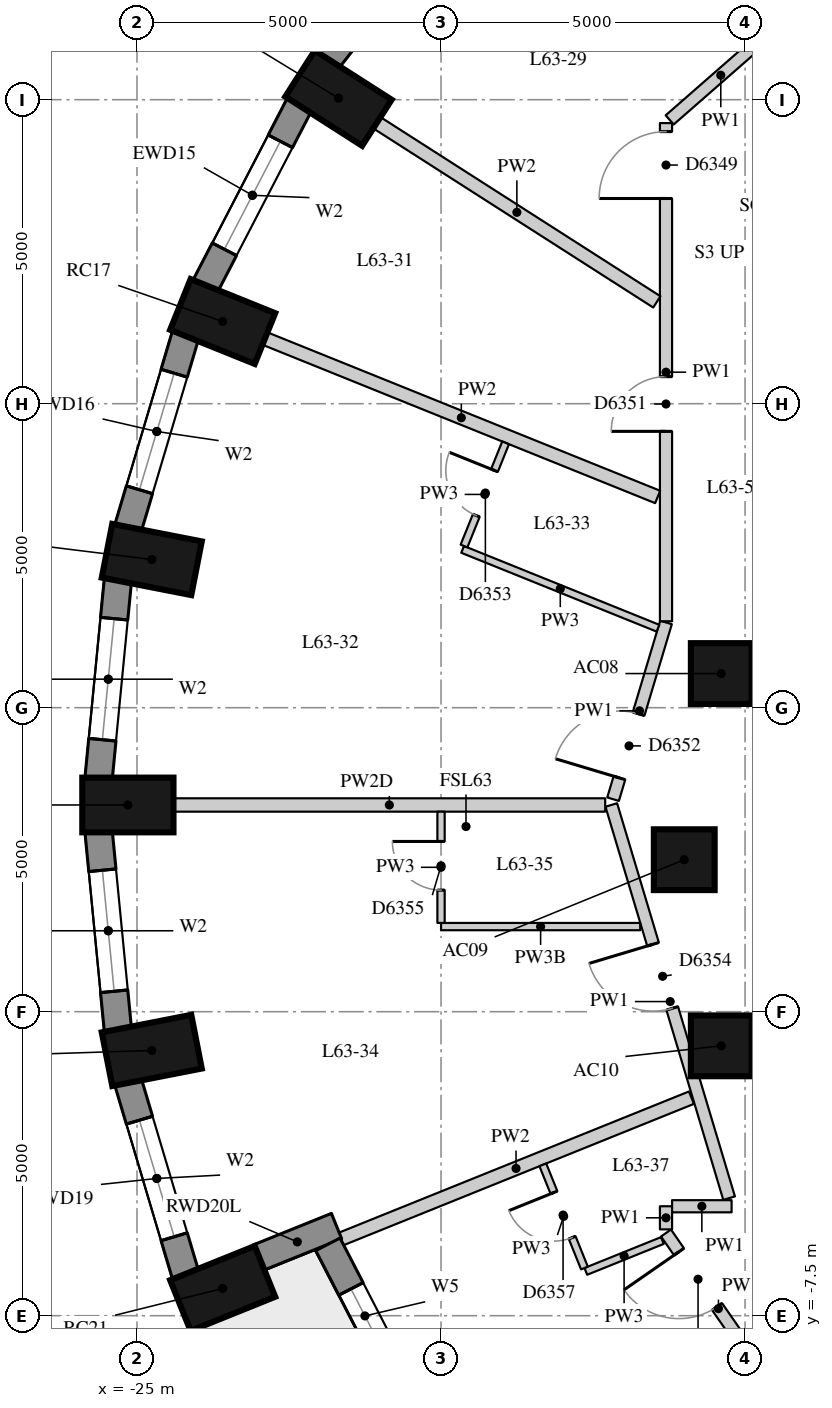
"""IFC4 building model, lengths in metres.
Left out: names, types, materials, properties, quantities, classifications, styles, units other than length and angle.
Written with IfcOpenShell. Run it as: python <this file> out.ifc"""

import sys

from ifc_helpers import new_model, si_unit, direction, frame, frame_2d, origin, origin_2d, place, context, subcontext, project, spatial, rectangle, extrude, element, fill, save


model = new_model("IFC4")
c1 = context("Model", 3, precision=1e-05, world=origin(), true_north=direction((0.0, 1.0)))
c2 = subcontext(c1, "Body", "Model", "MODEL_VIEW")
j1 = project(units=[si_unit("LENGTHUNIT", "METRE"), si_unit("PLANEANGLEUNIT", "RADIAN")], contexts=[c1])
p1 = place(None, origin())
s1 = spatial("IfcSite", under=j1, at=p1, CompositionType="ELEMENT")
p2 = place(p1, origin())
s2 = spatial("IfcBuilding", under=s1, at=p2, CompositionType="ELEMENT")
p3 = place(p2, frame((0.0, 0.0, 222.2)))
s3 = spatial("IfcBuildingStorey", under=s2, at=p3, CompositionType="ELEMENT", Elevation=222.2)
for number, where, z_axis, x_axis in (
    (1, (-21.687, 12.525, 0.0), (0.0, 0.0, 1.0), (-0.842, 0.539, 0.0)),
    (2, (-23.591, 8.852, 0.0), (0.0, 0.0, 1.0), (-0.927, 0.374, 0.0)),
    (3, (-24.757, 4.937, 0.0), (0.0, 0.0, 1.0), (-0.981, 0.192, 0.0)),
    (4, (-25.15, 0.9, 0.0), (0.0, 0.0, 1.0), (-1.0, 0.0, 0.0)),
    (5, (-24.757, -3.137, 0.0), (0.0, 0.0, 1.0), (-0.981, -0.192, 0.0)),
    (6, (-23.591, -7.052, 0.0), (0.0, 0.0, 1.0), (-0.927, -0.374, 0.0)),
):
    element("IfcColumn", number, at=place(p3, frame(where, z_axis=z_axis, x_axis=x_axis)), inside=s3, PredefinedType="COLUMN", context=c2, shape_type="SweptSolid", body=[
        extrude(rectangle(XDim=1.5, YDim=0.9, at=origin_2d()), origin(), (0.0, 0.0, 1.0), 3.3),
    ])
for number, where, z_axis, x_axis in (
    (7, (-15.391, 3.062, 0.0), (0.0, 0.0, 1.0), (1.0, 0.0, 0.0)),
    (8, (-16.0, 0.0, 0.0), (0.0, 0.0, 1.0), (1.0, 0.0, 0.0)),
    (9, (-15.391, -3.062, 0.0), (0.0, 0.0, 1.0), (1.0, 0.0, 0.0)),
):
    element("IfcColumn", number, at=place(p3, frame(where, z_axis=z_axis, x_axis=x_axis)), inside=s3, PredefinedType="COLUMN", context=c2, shape_type="SweptSolid", body=[
        extrude(rectangle(XDim=1.0, YDim=1.0, at=origin_2d()), origin(), (0.0, 0.0, 1.0), 3.3),
    ])
p4 = place(p3, frame((-19.751, 15.861, 0.0), z_axis=(0.0, 0.0, 1.0), x_axis=(-0.614220816451, -0.789134201919, 0.0)))
e10 = element("IfcWall", 10, at=p4, inside=s3, PredefinedType="SOLIDWALL", context=c2, shape_type="SweptSolid", body=[
    extrude(rectangle(XDim=3.438, YDim=0.45, at=frame_2d((1.719, 0.0))), origin(), (0.0, 0.0, 1.0), 3.02),
])
p5 = place(p4, frame((0.719, 0.0, 0.4)))
e11 = element("IfcOpeningElement", 11, at=p5, cuts=e10, PredefinedType="OPENING", context=c2, shape_type="SweptSolid", body=[
    extrude(rectangle(XDim=2.0, YDim=1.75, at=frame_2d((1.0, 0.875))), frame((0.0, 0.235, 0.0), z_axis=(0.0, -1.0, 0.0), x_axis=(1.0, 0.0, 0.0)), (0.0, 0.0, 1.0), 0.47),
])
p6 = place(p3, frame((-22.327, 12.424, 0.0), z_axis=(0.0, 0.0, 1.0), x_axis=(-0.460232593174, -0.887798378113, 0.0)))
e12 = element("IfcWall", 12, at=p6, inside=s3, PredefinedType="SOLIDWALL", context=c2, shape_type="SweptSolid", body=[
    extrude(rectangle(XDim=3.371, YDim=0.45, at=frame_2d((1.685, 0.0))), origin(), (0.0, 0.0, 1.0), 3.02),
])
p7 = place(p6, frame((0.685, 0.0, 0.4)))
e13 = element("IfcOpeningElement", 13, at=p7, cuts=e12, PredefinedType="OPENING", context=c2, shape_type="SweptSolid", body=[
    extrude(rectangle(XDim=2.0, YDim=1.75, at=frame_2d((1.0, 0.875))), frame((0.0, 0.235, 0.0), z_axis=(0.0, -1.0, 0.0), x_axis=(1.0, 0.0, 0.0)), (0.0, 0.0, 1.0), 0.47),
])
p8 = place(p3, frame((-24.2, 8.634, 0.0), z_axis=(0.0, 0.0, 1.0), x_axis=(-0.285444972963, -0.958395099847, 0.0)))
e14 = element("IfcWall", 14, at=p8, inside=s3, PredefinedType="SOLIDWALL", context=c2, shape_type="SweptSolid", body=[
    extrude(rectangle(XDim=3.32, YDim=0.45, at=frame_2d((1.66, 0.0))), origin(), (0.0, 0.0, 1.0), 3.02),
])
p9 = place(p8, frame((0.66, 0.0, 0.4)))
e15 = element("IfcOpeningElement", 15, at=p9, cuts=e14, PredefinedType="OPENING", context=c2, shape_type="SweptSolid", body=[
    extrude(rectangle(XDim=2.0, YDim=1.75, at=frame_2d((1.0, 0.875))), frame((0.0, 0.235, 0.0), z_axis=(0.0, -1.0, 0.0), x_axis=(1.0, 0.0, 0.0)), (0.0, 0.0, 1.0), 0.47),
])
p10 = place(p3, frame((-25.313, 4.608, 0.0), z_axis=(0.0, 0.0, 1.0), x_axis=(-0.096824116835, -0.995301507283, 0.0)))
e16 = element("IfcWall", 16, at=p10, inside=s3, PredefinedType="SOLIDWALL", context=c2, shape_type="SweptSolid", body=[
    extrude(rectangle(XDim=3.293, YDim=0.45, at=frame_2d((1.646, 0.0))), origin(), (0.0, 0.0, 1.0), 3.02),
])
p11 = place(p10, frame((0.646, 0.0, 0.4)))
e17 = element("IfcOpeningElement", 17, at=p11, cuts=e16, PredefinedType="OPENING", context=c2, shape_type="SweptSolid", body=[
    extrude(rectangle(XDim=2.0, YDim=1.75, at=frame_2d((1.0, 0.875))), frame((0.0, 0.235, 0.0), z_axis=(0.0, -1.0, 0.0), x_axis=(1.0, 0.0, 0.0)), (0.0, 0.0, 1.0), 0.47),
])
p12 = place(p3, frame((-25.632, 0.47, 0.0), z_axis=(0.0, 0.0, 1.0), x_axis=(0.096816972749, -0.995302202242, 0.0)))
e18 = element("IfcWall", 18, at=p12, inside=s3, PredefinedType="SOLIDWALL", context=c2, shape_type="SweptSolid", body=[
    extrude(rectangle(XDim=3.293, YDim=0.45, at=frame_2d((1.646, 0.0))), origin(), (0.0, 0.0, 1.0), 3.02),
])
p13 = place(p12, frame((0.646, 0.0, 0.4)))
e19 = element("IfcOpeningElement", 19, at=p13, cuts=e18, PredefinedType="OPENING", context=c2, shape_type="SweptSolid", body=[
    extrude(rectangle(XDim=2.0, YDim=1.75, at=frame_2d((1.0, 0.875))), frame((0.0, 0.235, 0.0), z_axis=(0.0, -1.0, 0.0), x_axis=(1.0, 0.0, 0.0)), (0.0, 0.0, 1.0), 0.47),
])
p14 = place(p3, frame((-25.148, -3.652, 0.0), z_axis=(0.0, 0.0, 1.0), x_axis=(0.285444972963, -0.958395099847, 0.0)))
e20 = element("IfcWall", 20, at=p14, inside=s3, PredefinedType="SOLIDWALL", context=c2, shape_type="SweptSolid", body=[
    extrude(rectangle(XDim=3.32, YDim=0.45, at=frame_2d((1.66, 0.0))), origin(), (0.0, 0.0, 1.0), 3.02),
])
p15 = place(p14, frame((0.66, 0.0, 0.4)))
e21 = element("IfcOpeningElement", 21, at=p15, cuts=e20, PredefinedType="OPENING", context=c2, shape_type="SweptSolid", body=[
    extrude(rectangle(XDim=2.0, YDim=1.75, at=frame_2d((1.0, 0.875))), frame((0.0, 0.235, 0.0), z_axis=(0.0, -1.0, 0.0), x_axis=(1.0, 0.0, 0.0)), (0.0, 0.0, 1.0), 0.47),
])
p16 = place(p3, frame((-23.008, -6.546, 0.0), z_axis=(0.0, 0.0, 1.0), x_axis=(0.927346156366, 0.37420463155, 0.0)))
e22 = element("IfcWall", 22, at=p16, inside=s3, PredefinedType="SOLIDWALL", context=c2, shape_type="SweptSolid", body=[
    extrude(rectangle(XDim=1.39, YDim=0.45, at=frame_2d((0.695, 0.0))), origin(), (0.0, 0.0, 1.0), 3.02),
])
p17 = place(p3, frame((-21.861, -6.326, 0.0), z_axis=(0.0, 0.0, 1.0), x_axis=(0.45924645187, -0.888308896975, 0.0)))
e23 = element("IfcWall", 23, at=p17, inside=s3, PredefinedType="SOLIDWALL", context=c2, shape_type="SweptSolid", body=[
    extrude(rectangle(XDim=3.802, YDim=0.45, at=frame_2d((1.901, 0.0))), origin(), (0.0, 0.0, 1.0), 3.02),
])
p18 = place(p17, frame((0.826, 0.0, 0.4)))
e24 = element("IfcOpeningElement", 24, at=p18, cuts=e23, PredefinedType="OPENING", context=c2, shape_type="SweptSolid", body=[
    extrude(rectangle(XDim=1.0, YDim=1.75, at=frame_2d((0.5, 0.875))), frame((0.0, 0.235, 0.0), z_axis=(0.0, -1.0, 0.0), x_axis=(1.0, 0.0, 0.0)), (0.0, 0.0, 1.0), 0.47),
])
p19 = place(p17, frame((1.976, 0.0, 0.0)))
e25 = element("IfcOpeningElement", 25, at=p19, cuts=e23, PredefinedType="OPENING", context=c2, shape_type="SweptSolid", body=[
    extrude(rectangle(XDim=1.0, YDim=2.15, at=frame_2d((0.5, 1.075))), frame((0.0, 0.235, 0.0), z_axis=(0.0, -1.0, 0.0), x_axis=(1.0, 0.0, 0.0)), (0.0, 0.0, 1.0), 0.47),
])
p20 = place(p3, frame((-14.575, -8.627, 0.0), z_axis=(0.0, 0.0, 1.0), x_axis=(-0.569910381143, 0.821706856163, 0.0)))
e26 = element("IfcWall", 26, at=p20, inside=s3, PredefinedType="PARTITIONING", context=c2, shape_type="SweptSolid", body=[
    extrude(rectangle(XDim=3.026, YDim=0.2, at=frame_2d((1.513, 0.0))), origin(), (0.0, 0.0, 1.0), 3.02),
])
p21 = place(p20, frame((1.552, 0.0, 0.0)))
e27 = element("IfcOpeningElement", 27, at=p21, cuts=e26, PredefinedType="OPENING", context=c2, shape_type="SweptSolid", body=[
    extrude(rectangle(XDim=1.1, YDim=2.1, at=frame_2d((0.55, 1.05))), frame((0.0, 0.11, 0.0), z_axis=(0.0, -1.0, 0.0), x_axis=(1.0, 0.0, 0.0)), (0.0, 0.0, 1.0), 0.22),
])
p22 = place(p3, frame((-16.3, -6.08, 0.0), z_axis=(0.0, 0.0, 1.0), x_axis=(0.0, 1.0, 0.0)))
e28 = element("IfcWall", 28, at=p22, inside=s3, PredefinedType="PARTITIONING", context=c2, shape_type="SweptSolid", body=[
    extrude(rectangle(XDim=0.38, YDim=0.2, at=frame_2d((0.19, 0.0))), origin(), (0.0, 0.0, 1.0), 3.02),
])
p23 = place(p3, frame((-16.2, -5.7, 0.0), z_axis=(0.0, 0.0, 1.0), x_axis=(1.0, 0.0, 0.0)))
e29 = element("IfcWall", 29, at=p23, inside=s3, PredefinedType="PARTITIONING", context=c2, shape_type="SweptSolid", body=[
    extrude(rectangle(XDim=0.979, YDim=0.2, at=frame_2d((0.489, 0.0))), origin(), (0.0, 0.0, 1.0), 3.02),
])
p24 = place(p3, frame((-15.262, -5.567, 0.0), z_axis=(0.0, 0.0, 1.0), x_axis=(-0.28704593875, 0.957916817395, 0.0)))
e30 = element("IfcWall", 30, at=p24, inside=s3, PredefinedType="PARTITIONING", context=c2, shape_type="SweptSolid", body=[
    extrude(rectangle(XDim=6.751, YDim=0.2, at=frame_2d((3.375, 0.0))), origin(), (0.0, 0.0, 1.0), 3.02),
])
p25 = place(p24, frame((3.259, 0.0, 0.0)))
e31 = element("IfcOpeningElement", 31, at=p25, cuts=e30, PredefinedType="OPENING", context=c2, shape_type="SweptSolid", body=[
    extrude(rectangle(XDim=1.1, YDim=2.1, at=frame_2d((0.55, 1.05))), frame((0.0, 0.11, 0.0), z_axis=(0.0, -1.0, 0.0), x_axis=(1.0, 0.0, 0.0)), (0.0, 0.0, 1.0), 0.22),
])
p26 = place(p3, frame((-17.171, 0.995, 0.0), z_axis=(0.0, 0.0, 1.0), x_axis=(0.286919722033, 0.957954629984, 0.0)))
e32 = element("IfcWall", 32, at=p26, inside=s3, PredefinedType="PARTITIONING", context=c2, shape_type="SweptSolid", body=[
    extrude(rectangle(XDim=3.034, YDim=0.2, at=frame_2d((1.517, 0.0))), origin(), (0.0, 0.0, 1.0), 3.02),
])
p27 = place(p26, frame((0.365, 0.0, 0.0)))
e33 = element("IfcOpeningElement", 33, at=p27, cuts=e32, PredefinedType="OPENING", context=c2, shape_type="SweptSolid", body=[
    extrude(rectangle(XDim=1.1, YDim=2.1, at=frame_2d((0.55, 1.05))), frame((0.0, 0.11, 0.0), z_axis=(0.0, -1.0, 0.0), x_axis=(1.0, 0.0, 0.0)), (0.0, 0.0, 1.0), 0.22),
])
p28 = place(p3, frame((-16.3, 3.922, 0.0), z_axis=(0.0, 0.0, 1.0), x_axis=(0.0, 1.0, 0.0)))
e34 = element("IfcWall", 34, at=p28, inside=s3, PredefinedType="PARTITIONING", context=c2, shape_type="SweptSolid", body=[
    extrude(rectangle(XDim=8.193, YDim=0.2, at=frame_2d((4.097, 0.0))), origin(), (0.0, 0.0, 1.0), 3.02),
])
p29 = place(p28, frame((6.953, 0.0, 0.0)))
e35 = element("IfcOpeningElement", 35, at=p29, cuts=e34, PredefinedType="OPENING", context=c2, shape_type="SweptSolid", body=[
    extrude(rectangle(XDim=1.1, YDim=2.1, at=frame_2d((0.55, 1.05))), frame((0.0, 0.11, 0.0), z_axis=(0.0, -1.0, 0.0), x_axis=(1.0, 0.0, 0.0)), (0.0, 0.0, 1.0), 0.22),
])
p30 = place(p28, frame((3.123, 0.0, 0.0)))
e36 = element("IfcOpeningElement", 36, at=p30, cuts=e34, PredefinedType="OPENING", context=c2, shape_type="SweptSolid", body=[
    extrude(rectangle(XDim=0.9, YDim=2.1, at=frame_2d((0.45, 1.05))), frame((0.0, 0.11, 0.0), z_axis=(0.0, -1.0, 0.0), x_axis=(1.0, 0.0, 0.0)), (0.0, 0.0, 1.0), 0.22),
])
p31 = place(p3, frame((-16.24, 12.168, 0.0), z_axis=(0.0, 0.0, 1.0), x_axis=(0.752820521129, 0.658225844956, 0.0)))
e37 = element("IfcWall", 37, at=p31, inside=s3, PredefinedType="PARTITIONING", context=c2, shape_type="SweptSolid", body=[
    extrude(rectangle(XDim=2.232, YDim=0.2, at=frame_2d((1.116, 0.0))), origin(), (0.0, 0.0, 1.0), 3.02),
])
p32 = place(p3, frame((-21.055, 12.121, 0.0), z_axis=(0.0, 0.0, 1.0), x_axis=(0.842286811608, -0.539029616061, 0.0)))
e38 = element("IfcWall", 38, at=p32, inside=s3, PredefinedType="PARTITIONING", context=c2, shape_type="SweptSolid", body=[
    extrude(rectangle(XDim=5.466, YDim=0.22, at=frame_2d((2.733, 0.0))), origin(), (0.0, 0.0, 1.0), 3.02),
])
p33 = place(p3, frame((-22.896, 8.571, 0.0), z_axis=(0.0, 0.0, 1.0), x_axis=(0.927387137769, -0.374103056256, 0.0)))
e39 = element("IfcWall", 39, at=p33, inside=s3, PredefinedType="PARTITIONING", context=c2, shape_type="SweptSolid", body=[
    extrude(rectangle(XDim=6.964, YDim=0.22, at=frame_2d((3.482, 0.0))), origin(), (0.0, 0.0, 1.0), 3.02),
])
p34 = place(p3, frame((-24.4, 0.9, 0.0), z_axis=(0.0, 0.0, 1.0), x_axis=(1.0, 0.0, 0.0)))
e40 = element("IfcWall", 40, at=p34, inside=s3, PredefinedType="PARTITIONING", context=c2, shape_type="SweptSolid", body=[
    extrude(rectangle(XDim=7.1, YDim=0.22, at=frame_2d((3.55, 0.0))), origin(), (0.0, 0.0, 1.0), 2.47),
])
p35 = place(p3, frame((-21.651, -6.241, 0.0), z_axis=(0.0, 0.0, 1.0), x_axis=(0.927390089179, 0.37409573974, 0.0)))
e41 = element("IfcWall", 41, at=p35, inside=s3, PredefinedType="PARTITIONING", context=c2, shape_type="SweptSolid", body=[
    extrude(rectangle(XDim=6.221, YDim=0.22, at=frame_2d((3.11, 0.0))), origin(), (0.0, 0.0, 1.0), 3.02),
])
p36 = place(p3, frame((-16.433, 3.808, 0.0), z_axis=(0.0, 0.0, 1.0), x_axis=(-0.927374031513, 0.374135544522, 0.0)))
e42 = element("IfcWall", 42, at=p36, inside=s3, PredefinedType="PARTITIONING", context=c2, shape_type="SweptSolid", body=[
    extrude(rectangle(XDim=3.464, YDim=0.12, at=frame_2d((1.732, 0.0))), origin(), (0.0, 0.0, 1.0), 3.02),
])
p37 = place(p3, frame((-16.725, -1.1, 0.0), z_axis=(0.0, 0.0, 1.0), x_axis=(-1.0, 0.0, 0.0)))
e43 = element("IfcWall", 43, at=p37, inside=s3, PredefinedType="PARTITIONING", context=c2, shape_type="SweptSolid", body=[
    extrude(rectangle(XDim=3.275, YDim=0.12, at=frame_2d((1.638, 0.0))), origin(), (0.0, 0.0, 1.0), 2.47),
])
p38 = place(p3, frame((-16.36, -6.264, 0.0), z_axis=(0.0, 0.0, 1.0), x_axis=(-0.927381089245, -0.374118049967, 0.0)))
e44 = element("IfcWall", 44, at=p38, inside=s3, PredefinedType="PARTITIONING", context=c2, shape_type="SweptSolid", body=[
    extrude(rectangle(XDim=1.357, YDim=0.12, at=frame_2d((0.679, 0.0))), origin(), (0.0, 0.0, 1.0), 3.02),
])
p39 = place(p3, frame((-19.622, 5.159, 0.0), z_axis=(0.0, 0.0, 1.0), x_axis=(0.373873925611, 0.927479534948, 0.0)))
e45 = element("IfcWall", 45, at=p39, inside=s3, PredefinedType="PARTITIONING", context=c2, shape_type="SweptSolid", body=[
    extrude(rectangle(XDim=1.83, YDim=0.12, at=frame_2d((0.915, 0.0))), origin(), (0.0, 0.0, 1.0), 3.02),
])
p40 = place(p39, frame((0.54, 0.0, 0.0)))
e46 = element("IfcOpeningElement", 46, at=p40, cuts=e45, PredefinedType="OPENING", context=c2, shape_type="SweptSolid", body=[
    extrude(rectangle(XDim=0.8, YDim=2.1, at=frame_2d((0.4, 1.05))), frame((0.0, 0.07, 0.0), z_axis=(0.0, -1.0, 0.0), x_axis=(1.0, 0.0, 0.0)), (0.0, 0.0, 1.0), 0.14),
])
p41 = place(p3, frame((-20.0, -1.04, 0.0), z_axis=(0.0, 0.0, 1.0), x_axis=(0.0, 1.0, 0.0)))
e47 = element("IfcWall", 47, at=p41, inside=s3, PredefinedType="PARTITIONING", context=c2, shape_type="SweptSolid", body=[
    extrude(rectangle(XDim=1.83, YDim=0.12, at=frame_2d((0.915, 0.0))), origin(), (0.0, 0.0, 1.0), 3.02),
])
p42 = place(p41, frame((0.54, 0.0, 0.0)))
e48 = element("IfcOpeningElement", 48, at=p42, cuts=e47, PredefinedType="OPENING", context=c2, shape_type="SweptSolid", body=[
    extrude(rectangle(XDim=0.8, YDim=2.1, at=frame_2d((0.4, 1.05))), frame((0.0, 0.07, 0.0), z_axis=(0.0, -1.0, 0.0), x_axis=(1.0, 0.0, 0.0)), (0.0, 0.0, 1.0), 0.14),
])
p43 = place(p3, frame((-17.641, -6.716, 0.0), z_axis=(0.0, 0.0, 1.0), x_axis=(-0.374103450988, 0.927386978536, 0.0)))
e49 = element("IfcWall", 49, at=p43, inside=s3, PredefinedType="PARTITIONING", context=c2, shape_type="SweptSolid", body=[
    extrude(rectangle(XDim=1.83, YDim=0.12, at=frame_2d((0.915, 0.0))), origin(), (0.0, 0.0, 1.0), 3.02),
])
p44 = place(p43, frame((0.54, 0.0, 0.0)))
e50 = element("IfcOpeningElement", 50, at=p44, cuts=e49, PredefinedType="OPENING", context=c2, shape_type="SweptSolid", body=[
    extrude(rectangle(XDim=0.8, YDim=2.1, at=frame_2d((0.4, 1.05))), frame((0.0, 0.07, 0.0), z_axis=(0.0, -1.0, 0.0), x_axis=(1.0, 0.0, 0.0)), (0.0, 0.0, 1.0), 0.14),
])
p45 = place(p7, origin())
e51 = element("IfcWindow", 51, at=p45, inside=s3, PartitioningType="SINGLE_PANEL", PredefinedType="WINDOW", context=c2, shape_type="SweptSolid", body=[
    extrude(rectangle(XDim=2.0, YDim=1.75, at=frame_2d((1.0, 0.875))), frame((0.0, 0.035, 0.0), z_axis=(0.0, -1.0, 0.0), x_axis=(1.0, 0.0, 0.0)), (0.0, 0.0, 1.0), 0.06),
])
fill(e13, e51)
p46 = place(p9, origin())
e52 = element("IfcWindow", 52, at=p46, inside=s3, PartitioningType="SINGLE_PANEL", PredefinedType="WINDOW", context=c2, shape_type="SweptSolid", body=[
    extrude(rectangle(XDim=2.0, YDim=1.75, at=frame_2d((1.0, 0.875))), frame((0.0, 0.035, 0.0), z_axis=(0.0, -1.0, 0.0), x_axis=(1.0, 0.0, 0.0)), (0.0, 0.0, 1.0), 0.06),
])
fill(e15, e52)
p47 = place(p11, origin())
e53 = element("IfcWindow", 53, at=p47, inside=s3, PartitioningType="SINGLE_PANEL", PredefinedType="WINDOW", context=c2, shape_type="SweptSolid", body=[
    extrude(rectangle(XDim=2.0, YDim=1.75, at=frame_2d((1.0, 0.875))), frame((0.0, 0.035, 0.0), z_axis=(0.0, -1.0, 0.0), x_axis=(1.0, 0.0, 0.0)), (0.0, 0.0, 1.0), 0.06),
])
fill(e17, e53)
p48 = place(p13, origin())
e54 = element("IfcWindow", 54, at=p48, inside=s3, PartitioningType="SINGLE_PANEL", PredefinedType="WINDOW", context=c2, shape_type="SweptSolid", body=[
    extrude(rectangle(XDim=2.0, YDim=1.75, at=frame_2d((1.0, 0.875))), frame((0.0, 0.035, 0.0), z_axis=(0.0, -1.0, 0.0), x_axis=(1.0, 0.0, 0.0)), (0.0, 0.0, 1.0), 0.06),
])
fill(e19, e54)
p49 = place(p15, origin())
e55 = element("IfcWindow", 55, at=p49, inside=s3, PartitioningType="SINGLE_PANEL", PredefinedType="WINDOW", context=c2, shape_type="SweptSolid", body=[
    extrude(rectangle(XDim=2.0, YDim=1.75, at=frame_2d((1.0, 0.875))), frame((0.0, 0.035, 0.0), z_axis=(0.0, -1.0, 0.0), x_axis=(1.0, 0.0, 0.0)), (0.0, 0.0, 1.0), 0.06),
])
fill(e21, e55)
p50 = place(p18, origin())
e56 = element("IfcWindow", 56, at=p50, inside=s3, PartitioningType="SINGLE_PANEL", PredefinedType="WINDOW", context=c2, shape_type="SweptSolid", body=[
    extrude(rectangle(XDim=1.0, YDim=1.75, at=frame_2d((0.5, 0.875))), frame((0.0, 0.035, 0.0), z_axis=(0.0, -1.0, 0.0), x_axis=(1.0, 0.0, 0.0)), (0.0, 0.0, 1.0), 0.06),
])
fill(e24, e56)
p51 = place(p29, origin())
e57 = element("IfcDoor", 57, at=p51, inside=s3, OperationType="SINGLE_SWING_LEFT", PredefinedType="DOOR", context=c2, shape_type="SweptSolid", body=[
    extrude(rectangle(XDim=1.1, YDim=2.1, at=frame_2d((0.55, 1.05))), frame((0.0, 0.025, 0.0), z_axis=(0.0, -1.0, 0.0), x_axis=(1.0, 0.0, 0.0)), (0.0, 0.0, 1.0), 0.05),
])
fill(e35, e57)
p52 = place(p30, origin())
e58 = element("IfcDoor", 58, at=p52, inside=s3, OperationType="SINGLE_SWING_LEFT", PredefinedType="DOOR", context=c2, shape_type="SweptSolid", body=[
    extrude(rectangle(XDim=0.9, YDim=2.1, at=frame_2d((0.45, 1.05))), frame((0.0, 0.025, 0.0), z_axis=(0.0, -1.0, 0.0), x_axis=(1.0, 0.0, 0.0)), (0.0, 0.0, 1.0), 0.05),
])
fill(e36, e58)
p53 = place(p27, origin())
e59 = element("IfcDoor", 59, at=p53, inside=s3, OperationType="SINGLE_SWING_LEFT", PredefinedType="DOOR", context=c2, shape_type="SweptSolid", body=[
    extrude(rectangle(XDim=1.1, YDim=2.1, at=frame_2d((0.55, 1.05))), frame((0.0, 0.025, 0.0), z_axis=(0.0, -1.0, 0.0), x_axis=(1.0, 0.0, 0.0)), (0.0, 0.0, 1.0), 0.05),
])
fill(e33, e59)
p54 = place(p40, origin())
e60 = element("IfcDoor", 60, at=p54, inside=s3, OperationType="SINGLE_SWING_RIGHT", PredefinedType="DOOR", context=c2, shape_type="SweptSolid", body=[
    extrude(rectangle(XDim=0.8, YDim=2.1, at=frame_2d((0.4, 1.05))), frame((0.0, 0.025, 0.0), z_axis=(0.0, -1.0, 0.0), x_axis=(1.0, 0.0, 0.0)), (0.0, 0.0, 1.0), 0.05),
])
fill(e46, e60)
p55 = place(p25, origin())
e61 = element("IfcDoor", 61, at=p55, inside=s3, OperationType="SINGLE_SWING_RIGHT", PredefinedType="DOOR", context=c2, shape_type="SweptSolid", body=[
    extrude(rectangle(XDim=1.1, YDim=2.1, at=frame_2d((0.55, 1.05))), frame((0.0, 0.025, 0.0), z_axis=(0.0, -1.0, 0.0), x_axis=(1.0, 0.0, 0.0)), (0.0, 0.0, 1.0), 0.05),
])
fill(e31, e61)
p56 = place(p42, origin())
e62 = element("IfcDoor", 62, at=p56, inside=s3, OperationType="SINGLE_SWING_RIGHT", PredefinedType="DOOR", context=c2, shape_type="SweptSolid", body=[
    extrude(rectangle(XDim=0.8, YDim=2.1, at=frame_2d((0.4, 1.05))), frame((0.0, 0.025, 0.0), z_axis=(0.0, -1.0, 0.0), x_axis=(1.0, 0.0, 0.0)), (0.0, 0.0, 1.0), 0.05),
])
fill(e48, e62)
p57 = place(p21, origin())
e63 = element("IfcDoor", 63, at=p57, inside=s3, OperationType="SINGLE_SWING_RIGHT", PredefinedType="DOOR", context=c2, shape_type="SweptSolid", body=[
    extrude(rectangle(XDim=1.1, YDim=2.1, at=frame_2d((0.55, 1.05))), frame((0.0, 0.025, 0.0), z_axis=(0.0, -1.0, 0.0), x_axis=(1.0, 0.0, 0.0)), (0.0, 0.0, 1.0), 0.05),
])
fill(e27, e63)
p58 = place(p44, origin())
e64 = element("IfcDoor", 64, at=p58, inside=s3, OperationType="SINGLE_SWING_RIGHT", PredefinedType="DOOR", context=c2, shape_type="SweptSolid", body=[
    extrude(rectangle(XDim=0.8, YDim=2.1, at=frame_2d((0.4, 1.05))), frame((0.0, 0.025, 0.0), z_axis=(0.0, -1.0, 0.0), x_axis=(1.0, 0.0, 0.0)), (0.0, 0.0, 1.0), 0.05),
])
fill(e50, e64)
save(model, sys.argv[1])
